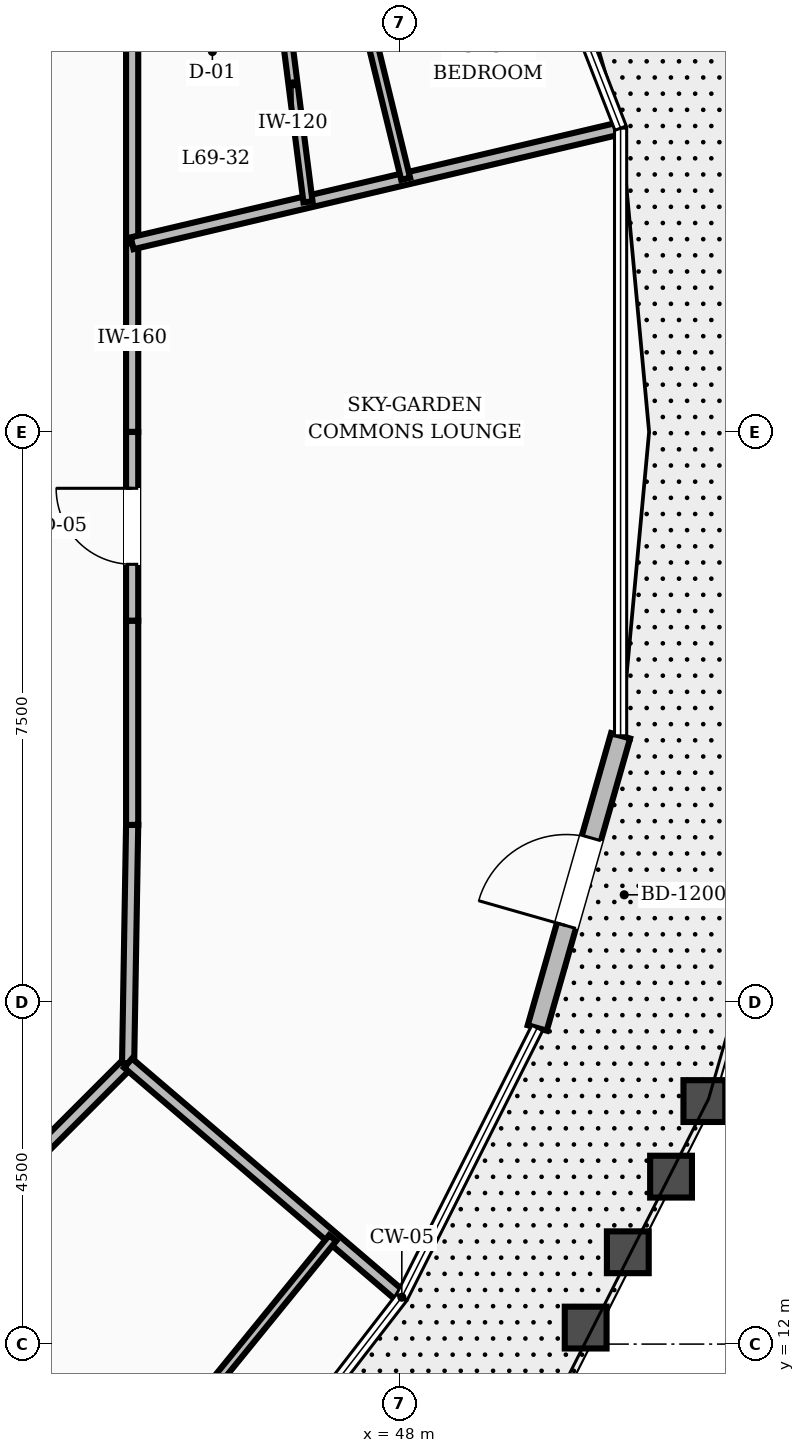
"""IFC4 building model, lengths in metres.
Left out: names, types, materials, properties, quantities, classifications, styles, units other than length and angle.
Written with IfcOpenShell. Run it as: python <this file> out.ifc"""

import sys

from ifc_helpers import new_model, si_unit, direction, frame, frame_2d, origin, place, context, subcontext, project, spatial, rectangle, extrude, element, fill, save


model = new_model("IFC4")
c1 = context("Model", 3, precision=1e-05, world=origin(), true_north=direction((0.0, 1.0)))
c2 = subcontext(c1, "Body", "Model", "MODEL_VIEW")
j1 = project(units=[si_unit("LENGTHUNIT", "METRE"), si_unit("PLANEANGLEUNIT", "RADIAN")], contexts=[c1])
p1 = place(None, origin())
s1 = spatial("IfcSite", under=j1, at=p1, CompositionType="ELEMENT")
p2 = place(p1, origin())
s2 = spatial("IfcBuilding", under=s1, at=p2, CompositionType="ELEMENT")
p3 = place(p2, frame((0.0, 0.0, 265.2)))
s3 = spatial("IfcBuildingStorey", under=s2, at=p3, CompositionType="ELEMENT", Elevation=265.2)
p4 = place(p3, frame((49.809, 16.159, 0.0), z_axis=(0.0, 0.0, 1.0), x_axis=(0.274438758608, 0.961604579738, 0.0)))
e1 = element("IfcWall", 1, at=p4, inside=s3, PredefinedType="STANDARD", context=c2, shape_type="SweptSolid", body=[
    extrude(rectangle(XDim=3.997, YDim=0.26, at=frame_2d((1.999, 0.0))), origin(), (0.0, 0.0, 1.0), 2.88),
])
p5 = place(p4, frame((1.398, 0.0, 0.0)))
e2 = element("IfcOpeningElement", 2, at=p5, cuts=e1, PredefinedType="OPENING", context=c2, shape_type="SweptSolid", body=[
    extrude(rectangle(XDim=1.2, YDim=2.15, at=frame_2d((0.6, 1.075))), frame((0.0, 0.14, 0.0), z_axis=(0.0, -1.0, 0.0), x_axis=(1.0, 0.0, 0.0)), (0.0, 0.0, 1.0), 0.28),
])
p6 = place(p3, frame((44.48, 24.0, 0.0), z_axis=(0.0, 0.0, 1.0), x_axis=(0.0, 1.0, 0.0)))
e3 = element("IfcWall", 3, at=p6, inside=s3, PredefinedType="SOLIDWALL", context=c2, shape_type="SweptSolid", body=[
    extrude(rectangle(XDim=2.482, YDim=0.16, at=frame_2d((1.241, 0.0))), origin(), (0.0, 0.0, 1.0), 2.87),
])
p7 = place(p3, frame((44.48, 26.482, 0.0), z_axis=(0.0, 0.0, 1.0), x_axis=(0.0, 1.0, 0.0)))
e4 = element("IfcWall", 4, at=p7, inside=s3, PredefinedType="SOLIDWALL", context=c2, shape_type="SweptSolid", body=[
    extrude(rectangle(XDim=2.687, YDim=0.16, at=frame_2d((1.344, 0.0))), origin(), (0.0, 0.0, 1.0), 2.87),
])
p8 = place(p3, frame((42.365, 13.635, 0.0), z_axis=(0.0, 0.0, 1.0), x_axis=(0.707106781187, 0.707106781187, 0.0)))
e5 = element("IfcWall", 5, at=p8, inside=s3, PredefinedType="SOLIDWALL", context=c2, shape_type="SweptSolid", body=[
    extrude(rectangle(XDim=2.916, YDim=0.16, at=frame_2d((1.458, 0.0))), origin(), (0.0, 0.0, 1.0), 2.87),
])
p9 = place(p3, frame((44.427, 15.697, 0.0), z_axis=(0.0, 0.0, 1.0), x_axis=(0.016981035134, 0.999855811828, 0.0)))
e6 = element("IfcWall", 6, at=p9, inside=s3, PredefinedType="SOLIDWALL", context=c2, shape_type="SweptSolid", body=[
    extrude(rectangle(XDim=3.134, YDim=0.16, at=frame_2d((1.567, 0.0))), origin(), (0.0, 0.0, 1.0), 2.87),
])
p10 = place(p3, frame((44.48, 18.831, 0.0), z_axis=(0.0, 0.0, 1.0), x_axis=(0.0, 1.0, 0.0)))
e7 = element("IfcWall", 7, at=p10, inside=s3, PredefinedType="SOLIDWALL", context=c2, shape_type="SweptSolid", body=[
    extrude(rectangle(XDim=2.687, YDim=0.16, at=frame_2d((1.344, 0.0))), origin(), (0.0, 0.0, 1.0), 2.87),
])
p11 = place(p3, frame((44.48, 21.518, 0.0), z_axis=(0.0, 0.0, 1.0), x_axis=(0.0, 1.0, 0.0)))
e8 = element("IfcWall", 8, at=p11, inside=s3, PredefinedType="SOLIDWALL", context=c2, shape_type="SweptSolid", body=[
    extrude(rectangle(XDim=2.482, YDim=0.16, at=frame_2d((1.241, 0.0))), origin(), (0.0, 0.0, 1.0), 2.87),
])
p12 = place(p11, frame((0.741, 0.0, 0.0)))
e9 = element("IfcOpeningElement", 9, at=p12, cuts=e8, PredefinedType="OPENING", context=c2, shape_type="SweptSolid", body=[
    extrude(rectangle(XDim=1.0, YDim=2.1, at=frame_2d((0.5, 1.05))), frame((0.0, 0.09, 0.0), z_axis=(0.0, -1.0, 0.0), x_axis=(1.0, 0.0, 0.0)), (0.0, 0.0, 1.0), 0.18),
])
p13 = place(p3, frame((44.427, 15.697, 0.0), z_axis=(0.0, 0.0, 1.0), x_axis=(0.759954557094, -0.649976208143, 0.0)))
e10 = element("IfcWall", 10, at=p13, inside=s3, PredefinedType="SOLIDWALL", context=c2, shape_type="SweptSolid", body=[
    extrude(rectangle(XDim=4.688, YDim=0.16, at=frame_2d((2.344, 0.0))), origin(), (0.0, 0.0, 1.0), 2.87),
])
p14 = place(p3, frame((44.48, 26.482, 0.0), z_axis=(0.0, 0.0, 1.0), x_axis=(0.973328646979, 0.229415223928, 0.0)))
e11 = element("IfcWall", 11, at=p14, inside=s3, PredefinedType="SOLIDWALL", context=c2, shape_type="SweptSolid", body=[
    extrude(rectangle(XDim=6.552, YDim=0.16, at=frame_2d((3.276, 0.0))), origin(), (0.0, 0.0, 1.0), 2.87),
])
p15 = place(p3, frame((46.793, 27.028, 0.0), z_axis=(0.0, 0.0, 1.0), x_axis=(-0.126262657016, 0.99199684548, 0.0)))
e12 = element("IfcWall", 12, at=p15, inside=s3, PredefinedType="PARTITIONING", context=c2, shape_type="SweptSolid", body=[
    extrude(rectangle(XDim=3.129, YDim=0.12, at=frame_2d((1.564, 0.0))), origin(), (0.0, 0.0, 1.0), 2.87),
])
p16 = place(p3, frame((48.079, 27.331, 0.0), z_axis=(0.0, 0.0, 1.0), x_axis=(-0.237199115633, 0.971461054054, 0.0)))
e13 = element("IfcWall", 13, at=p16, inside=s3, PredefinedType="PARTITIONING", context=c2, shape_type="SweptSolid", body=[
    extrude(rectangle(XDim=6.894, YDim=0.12, at=frame_2d((3.447, 0.0))), origin(), (0.0, 0.0, 1.0), 2.87),
])
p17 = place(p16, frame((4.086, 0.0, 0.0)))
e14 = element("IfcOpeningElement", 14, at=p17, cuts=e13, PredefinedType="OPENING", context=c2, shape_type="SweptSolid", body=[
    extrude(rectangle(XDim=0.95, YDim=2.1, at=frame_2d((0.475, 1.05))), frame((0.0, 0.07, 0.0), z_axis=(0.0, -1.0, 0.0), x_axis=(1.0, 0.0, 0.0)), (0.0, 0.0, 1.0), 0.14),
])
p18 = place(p3, frame((44.806, 10.553, 0.0), z_axis=(0.0, 0.0, 1.0), x_axis=(0.63123970245, 0.775587801638, 0.0)))
e15 = element("IfcWall", 15, at=p18, inside=s3, PredefinedType="PARTITIONING", context=c2, shape_type="SweptSolid", body=[
    extrude(rectangle(XDim=3.663, YDim=0.12, at=frame_2d((1.832, 0.0))), origin(), (0.0, 0.0, 1.0), 2.87),
])
p19 = place(p5, origin())
e16 = element("IfcDoor", 16, at=p19, inside=s3, OperationType="SINGLE_SWING_LEFT", PredefinedType="DOOR", context=c2, shape_type="SweptSolid", body=[
    extrude(rectangle(XDim=1.2, YDim=2.15, at=frame_2d((0.6, 1.075))), frame((0.0, 0.025, 0.0), z_axis=(0.0, -1.0, 0.0), x_axis=(1.0, 0.0, 0.0)), (0.0, 0.0, 1.0), 0.05),
])
fill(e2, e16)
p20 = place(p12, origin())
e17 = element("IfcDoor", 17, at=p20, inside=s3, OperationType="SINGLE_SWING_RIGHT", PredefinedType="DOOR", context=c2, shape_type="SweptSolid", body=[
    extrude(rectangle(XDim=1.0, YDim=2.1, at=frame_2d((0.5, 1.05))), frame((0.0, 0.025, 0.0), z_axis=(0.0, -1.0, 0.0), x_axis=(1.0, 0.0, 0.0)), (0.0, 0.0, 1.0), 0.05),
])
fill(e9, e17)
save(model, sys.argv[1])
